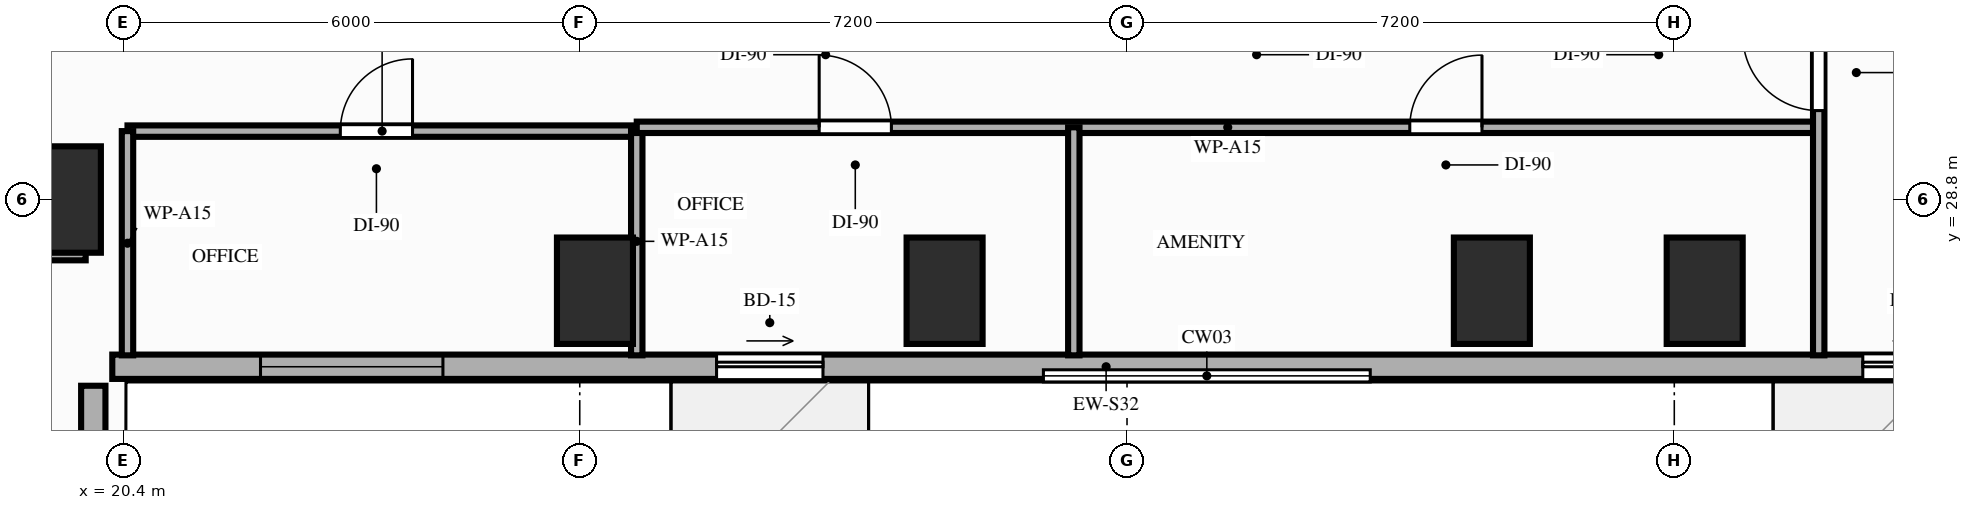
"""IFC4 building model, lengths in metres.
Left out: names, types, materials, properties, quantities, classifications, styles, units other than length and angle.
Written with IfcOpenShell. Run it as: python <this file> out.ifc"""

import sys

from ifc_helpers import new_model, si_unit, direction, frame, frame_2d, origin, origin_2d, place, context, subcontext, project, spatial, rectangle, extrude, element, fill, save


model = new_model("IFC4")
c1 = context("Model", 3, precision=1e-05, world=origin(), true_north=direction((0.0, 1.0)))
c2 = subcontext(c1, "Body", "Model", "MODEL_VIEW")
j1 = project(units=[si_unit("LENGTHUNIT", "METRE"), si_unit("PLANEANGLEUNIT", "RADIAN")], contexts=[c1])
p1 = place(None, origin())
s1 = spatial("IfcSite", under=j1, at=p1, CompositionType="ELEMENT")
p2 = place(p1, origin())
s2 = spatial("IfcBuilding", under=s1, at=p2, CompositionType="ELEMENT")
p3 = place(p2, frame((0.0, 0.0, 46.8)))
s3 = spatial("IfcBuildingStorey", under=s2, at=p3, CompositionType="ELEMENT", Elevation=46.8)
for number, where, z_axis, x_axis in (
    (1, (19.6, 28.8, 0.0), (0.0, 0.0, 1.0), (1.0, 0.0, 0.0)),
    (2, (26.6, 27.6, 0.0), (0.0, 0.0, 1.0), (1.0, 0.0, 0.0)),
    (3, (31.2, 27.6, 0.0), (0.0, 0.0, 1.0), (1.0, 0.0, 0.0)),
    (4, (38.4, 27.6, 0.0), (0.0, 0.0, 1.0), (1.0, 0.0, 0.0)),
    (5, (41.2, 27.6, 0.0), (0.0, 0.0, 1.0), (1.0, 0.0, 0.0)),
):
    element("IfcColumn", number, at=place(p3, frame(where, z_axis=z_axis, x_axis=x_axis)), inside=s3, PredefinedType="COLUMN", context=c2, shape_type="SweptSolid", body=[
        extrude(rectangle(XDim=1.0, YDim=1.4, at=origin_2d()), origin(), (0.0, 0.0, 1.0), 3.2),
    ])
p4 = place(p3, frame((20.0, 8.8, 0.0), z_axis=(0.0, 0.0, 1.0), x_axis=(0.0, 1.0, 0.0)))
e6 = element("IfcWall", 6, at=p4, inside=s3, PredefinedType="STANDARD", context=c2, shape_type="SweptSolid", body=[
    extrude(rectangle(XDim=17.55, YDim=0.32, at=frame_2d((8.775, 0.0))), origin(), (0.0, 0.0, 1.0), 2.41),
])
p5 = place(p4, frame((10.7, 0.0, 0.85)))
e7 = element("IfcOpeningElement", 7, at=p5, cuts=e6, PredefinedType="OPENING", context=c2, shape_type="SweptSolid", body=[
    extrude(rectangle(XDim=2.4, YDim=1.31, at=frame_2d((1.2, 0.655))), frame((0.0, 0.17, 0.0), z_axis=(0.0, -1.0, 0.0), x_axis=(1.0, 0.0, 0.0)), (0.0, 0.0, 1.0), 0.34),
])
p6 = place(p3, frame((20.25, 26.6, 0.0), z_axis=(0.0, 0.0, 1.0), x_axis=(1.0, 0.0, 0.0)))
e8 = element("IfcWall", 8, at=p6, inside=s3, PredefinedType="STANDARD", context=c2, shape_type="SweptSolid", body=[
    extrude(rectangle(XDim=26.15, YDim=0.32, at=frame_2d((13.075, 0.0))), origin(), (0.0, 0.0, 1.0), 3.02),
])
p7 = place(p6, frame((7.95, 0.0, 0.0)))
e9 = element("IfcOpeningElement", 9, at=p7, cuts=e8, PredefinedType="OPENING", context=c2, shape_type="SweptSolid", body=[
    extrude(rectangle(XDim=1.4, YDim=2.1, at=frame_2d((0.7, 1.05))), frame((0.0, 0.17, 0.0), z_axis=(0.0, -1.0, 0.0), x_axis=(1.0, 0.0, 0.0)), (0.0, 0.0, 1.0), 0.34),
])
p8 = place(p6, frame((23.03, 0.0, 0.0)))
e10 = element("IfcOpeningElement", 10, at=p8, cuts=e8, PredefinedType="OPENING", context=c2, shape_type="SweptSolid", body=[
    extrude(rectangle(XDim=1.4, YDim=2.1, at=frame_2d((0.7, 1.05))), frame((0.0, 0.17, 0.0), z_axis=(0.0, -1.0, 0.0), x_axis=(1.0, 0.0, 0.0)), (0.0, 0.0, 1.0), 0.34),
])
p9 = place(p6, frame((1.95, 0.0, 0.85)))
e11 = element("IfcOpeningElement", 11, at=p9, cuts=e8, PredefinedType="OPENING", context=c2, shape_type="SweptSolid", body=[
    extrude(rectangle(XDim=2.4, YDim=1.8, at=frame_2d((1.2, 0.9))), frame((0.0, 0.17, 0.0), z_axis=(0.0, -1.0, 0.0), x_axis=(1.0, 0.0, 0.0)), (0.0, 0.0, 1.0), 0.34),
])
p10 = place(p3, frame((9.06, 28.1, 0.0), z_axis=(0.0, 0.0, 1.0), x_axis=(1.0, 0.0, 0.0)))
e12 = element("IfcWall", 12, at=p10, inside=s3, PredefinedType="PARTITIONING", context=c2, shape_type="SweptSolid", body=[
    extrude(rectangle(XDim=10.84, YDim=0.2, at=frame_2d((5.42, 0.0))), origin(), (0.0, 0.0, 1.0), 2.41),
])
p11 = place(p3, frame((20.45, 29.7, 0.0), z_axis=(0.0, 0.0, 1.0), x_axis=(1.0, 0.0, 0.0)))
e13 = element("IfcWall", 13, at=p11, inside=s3, PredefinedType="PARTITIONING", context=c2, shape_type="SweptSolid", body=[
    extrude(rectangle(XDim=6.7, YDim=0.15, at=frame_2d((3.35, 0.0))), origin(), (0.0, 0.0, 1.0), 3.02),
])
p12 = place(p11, frame((2.8, 0.0, 0.0)))
e14 = element("IfcOpeningElement", 14, at=p12, cuts=e13, PredefinedType="OPENING", context=c2, shape_type="SweptSolid", body=[
    extrude(rectangle(XDim=0.95, YDim=2.15, at=frame_2d((0.475, 1.075))), frame((0.0, 0.085, 0.0), z_axis=(0.0, -1.0, 0.0), x_axis=(1.0, 0.0, 0.0)), (0.0, 0.0, 1.0), 0.17),
])
p13 = place(p3, frame((20.45, 26.75, 0.0), z_axis=(0.0, 0.0, 1.0), x_axis=(0.0, 1.0, 0.0)))
e15 = element("IfcWall", 15, at=p13, inside=s3, PredefinedType="PARTITIONING", context=c2, shape_type="SweptSolid", body=[
    extrude(rectangle(XDim=2.95, YDim=0.15, at=frame_2d((1.475, 0.0))), origin(), (0.0, 0.0, 1.0), 2.41),
])
p14 = place(p3, frame((27.15, 26.75, 0.0), z_axis=(0.0, 0.0, 1.0), x_axis=(0.0, 1.0, 0.0)))
e16 = element("IfcWall", 16, at=p14, inside=s3, PredefinedType="PARTITIONING", context=c2, shape_type="SweptSolid", body=[
    extrude(rectangle(XDim=3.0, YDim=0.15, at=frame_2d((1.5, 0.0))), origin(), (0.0, 0.0, 1.0), 2.41),
])
p15 = place(p3, frame((27.15, 29.75, 0.0), z_axis=(0.0, 0.0, 1.0), x_axis=(1.0, 0.0, 0.0)))
e17 = element("IfcWall", 17, at=p15, inside=s3, PredefinedType="PARTITIONING", context=c2, shape_type="SweptSolid", body=[
    extrude(rectangle(XDim=15.55, YDim=0.15, at=frame_2d((7.775, 0.0))), origin(), (0.0, 0.0, 1.0), 2.41),
])
p16 = place(p15, frame((2.4, 0.0, 0.0)))
e18 = element("IfcOpeningElement", 18, at=p16, cuts=e17, PredefinedType="OPENING", context=c2, shape_type="SweptSolid", body=[
    extrude(rectangle(XDim=0.95, YDim=2.15, at=frame_2d((0.475, 1.075))), frame((0.0, 0.085, 0.0), z_axis=(0.0, -1.0, 0.0), x_axis=(1.0, 0.0, 0.0)), (0.0, 0.0, 1.0), 0.17),
])
p17 = place(p15, frame((10.17, 0.0, 0.0)))
e19 = element("IfcOpeningElement", 19, at=p17, cuts=e17, PredefinedType="OPENING", context=c2, shape_type="SweptSolid", body=[
    extrude(rectangle(XDim=0.95, YDim=2.15, at=frame_2d((0.475, 1.075))), frame((0.0, 0.085, 0.0), z_axis=(0.0, -1.0, 0.0), x_axis=(1.0, 0.0, 0.0)), (0.0, 0.0, 1.0), 0.17),
])
p18 = place(p3, frame((42.7, 26.75, 0.0), z_axis=(0.0, 0.0, 1.0), x_axis=(0.0, 1.0, 0.0)))
e20 = element("IfcWall", 20, at=p18, inside=s3, PredefinedType="PARTITIONING", context=c2, shape_type="SweptSolid", body=[
    extrude(rectangle(XDim=15.45, YDim=0.15, at=frame_2d((7.725, 0.0))), origin(), (0.0, 0.0, 1.0), 2.41),
])
p19 = place(p18, frame((3.22, 0.0, 0.0)))
e21 = element("IfcOpeningElement", 21, at=p19, cuts=e20, PredefinedType="OPENING", context=c2, shape_type="SweptSolid", body=[
    extrude(rectangle(XDim=1.0, YDim=2.15, at=frame_2d((0.5, 1.075))), frame((0.0, 0.085, 0.0), z_axis=(0.0, -1.0, 0.0), x_axis=(1.0, 0.0, 0.0)), (0.0, 0.0, 1.0), 0.17),
])
p20 = place(p3, frame((32.9, 26.75, 0.0), z_axis=(0.0, 0.0, 1.0), x_axis=(0.0, 1.0, 0.0)))
e22 = element("IfcWall", 22, at=p20, inside=s3, PredefinedType="PARTITIONING", context=c2, shape_type="SweptSolid", body=[
    extrude(rectangle(XDim=3.0, YDim=0.15, at=frame_2d((1.5, 0.0))), origin(), (0.0, 0.0, 1.0), 2.41),
])
p21 = place(p7, origin())
e23 = element("IfcDoor", 23, at=p21, inside=s3, OperationType="SLIDING_TO_RIGHT", PredefinedType="DOOR", context=c2, shape_type="SweptSolid", body=[
    extrude(rectangle(XDim=1.4, YDim=2.1, at=frame_2d((0.7, 1.05))), frame((0.0, 0.025, 0.0), z_axis=(0.0, -1.0, 0.0), x_axis=(1.0, 0.0, 0.0)), (0.0, 0.0, 1.0), 0.05),
])
fill(e9, e23)
p22 = place(p8, origin())
e24 = element("IfcDoor", 24, at=p22, inside=s3, OperationType="SLIDING_TO_RIGHT", PredefinedType="DOOR", context=c2, shape_type="SweptSolid", body=[
    extrude(rectangle(XDim=1.4, YDim=2.1, at=frame_2d((0.7, 1.05))), frame((0.0, 0.025, 0.0), z_axis=(0.0, -1.0, 0.0), x_axis=(1.0, 0.0, 0.0)), (0.0, 0.0, 1.0), 0.05),
])
fill(e10, e24)
p23 = place(p9, origin())
e25 = element("IfcWindow", 25, at=p23, inside=s3, PartitioningType="SINGLE_PANEL", PredefinedType="WINDOW", context=c2, shape_type="SweptSolid", body=[
    extrude(rectangle(XDim=2.4, YDim=1.8, at=frame_2d((1.2, 0.9))), frame((0.0, 0.03, 0.0), z_axis=(0.0, -1.0, 0.0), x_axis=(1.0, 0.0, 0.0)), (0.0, 0.0, 1.0), 0.06),
])
fill(e11, e25)
p24 = place(p12, origin())
e26 = element("IfcDoor", 26, at=p24, inside=s3, OperationType="SINGLE_SWING_RIGHT", PredefinedType="DOOR", context=c2, shape_type="SweptSolid", body=[
    extrude(rectangle(XDim=0.95, YDim=2.15, at=frame_2d((0.475, 1.075))), frame((0.0, 0.025, 0.0), z_axis=(0.0, -1.0, 0.0), x_axis=(1.0, 0.0, 0.0)), (0.0, 0.0, 1.0), 0.05),
])
fill(e14, e26)
p25 = place(p19, origin())
e27 = element("IfcDoor", 27, at=p25, inside=s3, OperationType="SINGLE_SWING_RIGHT", PredefinedType="DOOR", context=c2, shape_type="SweptSolid", body=[
    extrude(rectangle(XDim=1.0, YDim=2.15, at=frame_2d((0.5, 1.075))), frame((0.0, 0.025, 0.0), z_axis=(0.0, -1.0, 0.0), x_axis=(1.0, 0.0, 0.0)), (0.0, 0.0, 1.0), 0.05),
])
fill(e21, e27)
p26 = place(p16, origin())
e28 = element("IfcDoor", 28, at=p26, inside=s3, OperationType="SINGLE_SWING_LEFT", PredefinedType="DOOR", context=c2, shape_type="SweptSolid", body=[
    extrude(rectangle(XDim=0.95, YDim=2.15, at=frame_2d((0.475, 1.075))), frame((0.0, 0.025, 0.0), z_axis=(0.0, -1.0, 0.0), x_axis=(1.0, 0.0, 0.0)), (0.0, 0.0, 1.0), 0.05),
])
fill(e18, e28)
p27 = place(p17, origin())
e29 = element("IfcDoor", 29, at=p27, inside=s3, OperationType="SINGLE_SWING_RIGHT", PredefinedType="DOOR", context=c2, shape_type="SweptSolid", body=[
    extrude(rectangle(XDim=0.95, YDim=2.15, at=frame_2d((0.475, 1.075))), frame((0.0, 0.025, 0.0), z_axis=(0.0, -1.0, 0.0), x_axis=(1.0, 0.0, 0.0)), (0.0, 0.0, 1.0), 0.05),
])
fill(e19, e29)
save(model, sys.argv[1])
